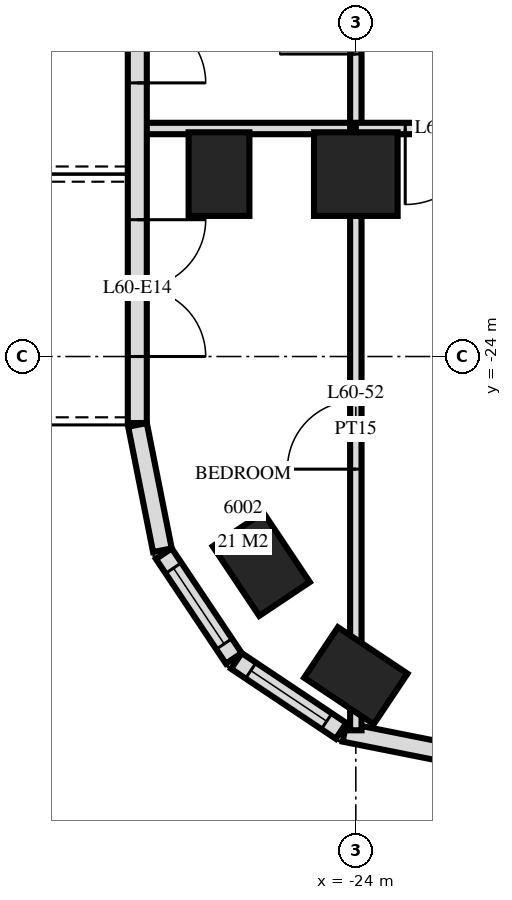
"""IFC4 building model, lengths in metres.
Left out: names, types, materials, properties, quantities, classifications, styles, units other than length and angle.
Written with IfcOpenShell. Run it as: python <this file> out.ifc"""

import sys

from ifc_helpers import new_model, si_unit, direction, frame, frame_2d, origin, origin_2d, place, context, subcontext, project, spatial, rectangle, extrude, element, fill, save


model = new_model("IFC4")
c1 = context("Model", 3, precision=1e-05, world=origin(), true_north=direction((0.0, 1.0)))
c2 = subcontext(c1, "Body", "Model", "MODEL_VIEW")
j1 = project(units=[si_unit("LENGTHUNIT", "METRE"), si_unit("PLANEANGLEUNIT", "RADIAN")], contexts=[c1])
p1 = place(None, origin())
s1 = spatial("IfcSite", under=j1, at=p1, CompositionType="ELEMENT")
p2 = place(p1, origin())
s2 = spatial("IfcBuilding", under=s1, at=p2, CompositionType="ELEMENT")
p3 = place(p2, frame((0.0, 0.0, 229.1)))
s3 = spatial("IfcBuildingStorey", under=s2, at=p3, CompositionType="ELEMENT", Elevation=229.1)
for number, where, z_axis, x_axis in (
    (1, (-25.8, -21.6, 0.0), (0.0, 0.0, 1.0), (0.0, 1.0, 0.0)),
    (2, (-25.244, -26.733, 0.0), (0.0, 0.0, 1.0), (-0.556, 0.831, 0.0)),
    (3, (-24.0, -28.2, 0.0), (0.0, 0.0, 1.0), (-0.831, 0.556, 0.0)),
):
    element("IfcColumn", number, at=place(p3, frame(where, z_axis=z_axis, x_axis=x_axis)), inside=s3, PredefinedType="COLUMN", context=c2, shape_type="SweptSolid", body=[
        extrude(rectangle(XDim=1.1, YDim=0.8, at=origin_2d()), origin(), (0.0, 0.0, 1.0), 3.5),
    ])
p4 = place(p3, frame((-24.0, -21.6, 0.0), z_axis=(0.0, 0.0, 1.0), x_axis=(1.0, 0.0, 0.0)))
e4 = element("IfcColumn", 4, at=p4, inside=s3, PredefinedType="COLUMN", context=c2, shape_type="SweptSolid", body=[
    extrude(rectangle(XDim=1.1, YDim=1.1, at=origin_2d()), origin(), (0.0, 0.0, 1.0), 3.5),
])
p5 = place(p3, frame((-26.875, -3.325, 0.0), z_axis=(0.0, 0.0, 1.0), x_axis=(0.0, -1.0, 0.0)))
e5 = element("IfcWall", 5, at=p5, inside=s3, PredefinedType="SOLIDWALL", context=c2, shape_type="SweptSolid", body=[
    extrude(rectangle(XDim=21.551, YDim=0.25, at=frame_2d((10.775, 0.0))), origin(), (0.0, 0.0, 1.0), 3.22),
])
p6 = place(p5, frame((6.575, 0.0, 0.0)))
e6 = element("IfcOpeningElement", 6, at=p6, cuts=e5, PredefinedType="OPENING", context=c2, shape_type="SweptSolid", body=[
    extrude(rectangle(XDim=1.8, YDim=2.4, at=frame_2d((0.9, 1.2))), frame((0.0, 0.135, 0.0), z_axis=(0.0, -1.0, 0.0), x_axis=(1.0, 0.0, 0.0)), (0.0, 0.0, 1.0), 0.27),
])
p7 = place(p5, frame((9.425, 0.0, 0.9)))
e7 = element("IfcOpeningElement", 7, at=p7, cuts=e5, PredefinedType="OPENING", context=c2, shape_type="SweptSolid", body=[
    extrude(rectangle(XDim=1.8, YDim=1.5, at=frame_2d((0.9, 0.75))), frame((0.0, 0.135, 0.0), z_axis=(0.0, -1.0, 0.0), x_axis=(1.0, 0.0, 0.0)), (0.0, 0.0, 1.0), 0.27),
])
p8 = place(p5, frame((12.575, 0.0, 0.9)))
e8 = element("IfcOpeningElement", 8, at=p8, cuts=e5, PredefinedType="OPENING", context=c2, shape_type="SweptSolid", body=[
    extrude(rectangle(XDim=1.2, YDim=1.5, at=frame_2d((0.6, 0.75))), frame((0.0, 0.135, 0.0), z_axis=(0.0, -1.0, 0.0), x_axis=(1.0, 0.0, 0.0)), (0.0, 0.0, 1.0), 0.27),
])
p9 = place(p5, frame((15.275, 0.0, 0.0)))
e9 = element("IfcOpeningElement", 9, at=p9, cuts=e5, PredefinedType="OPENING", context=c2, shape_type="SweptSolid", body=[
    extrude(rectangle(XDim=1.8, YDim=2.4, at=frame_2d((0.9, 1.2))), frame((0.0, 0.135, 0.0), z_axis=(0.0, -1.0, 0.0), x_axis=(1.0, 0.0, 0.0)), (0.0, 0.0, 1.0), 0.27),
])
p10 = place(p5, frame((18.875, 0.0, 0.0)))
e10 = element("IfcOpeningElement", 10, at=p10, cuts=e5, PredefinedType="OPENING", context=c2, shape_type="SweptSolid", body=[
    extrude(rectangle(XDim=1.8, YDim=2.4, at=frame_2d((0.9, 1.2))), frame((0.0, 0.135, 0.0), z_axis=(0.0, -1.0, 0.0), x_axis=(1.0, 0.0, 0.0)), (0.0, 0.0, 1.0), 0.27),
])
p11 = place(p3, frame((-26.873, -24.9, 0.0), z_axis=(0.0, 0.0, 1.0), x_axis=(0.195026884138, -0.980797896849, 0.0)))
e11 = element("IfcWall", 11, at=p11, inside=s3, PredefinedType="SOLIDWALL", context=c2, shape_type="SweptSolid", body=[
    extrude(rectangle(XDim=1.681, YDim=0.25, at=frame_2d((0.841, 0.0))), origin(), (0.0, 0.0, 1.0), 3.22),
])
p12 = place(p3, frame((-26.526, -26.594, 0.0), z_axis=(0.0, 0.0, 1.0), x_axis=(0.55555029066, -0.831482937015, 0.0)))
e12 = element("IfcWall", 12, at=p12, inside=s3, PredefinedType="SOLIDWALL", context=c2, shape_type="SweptSolid", body=[
    extrude(rectangle(XDim=1.656, YDim=0.25, at=frame_2d((0.828, 0.0))), origin(), (0.0, 0.0, 1.0), 3.22),
])
p13 = place(p12, frame((0.228, 0.0, 0.9)))
e13 = element("IfcOpeningElement", 13, at=p13, cuts=e12, PredefinedType="OPENING", context=c2, shape_type="SweptSolid", body=[
    extrude(rectangle(XDim=1.2, YDim=1.5, at=frame_2d((0.6, 0.75))), frame((0.0, 0.135, 0.0), z_axis=(0.0, -1.0, 0.0), x_axis=(1.0, 0.0, 0.0)), (0.0, 0.0, 1.0), 0.27),
])
p14 = place(p3, frame((-25.571, -28.006, 0.0), z_axis=(0.0, 0.0, 1.0), x_axis=(0.831482937015, -0.55555029066, 0.0)))
e14 = element("IfcWall", 14, at=p14, inside=s3, PredefinedType="SOLIDWALL", context=c2, shape_type="SweptSolid", body=[
    extrude(rectangle(XDim=1.656, YDim=0.25, at=frame_2d((0.828, 0.0))), origin(), (0.0, 0.0, 1.0), 3.22),
])
p15 = place(p14, frame((0.228, 0.0, 0.9)))
e15 = element("IfcOpeningElement", 15, at=p15, cuts=e14, PredefinedType="OPENING", context=c2, shape_type="SweptSolid", body=[
    extrude(rectangle(XDim=1.2, YDim=1.5, at=frame_2d((0.6, 0.75))), frame((0.0, 0.135, 0.0), z_axis=(0.0, -1.0, 0.0), x_axis=(1.0, 0.0, 0.0)), (0.0, 0.0, 1.0), 0.27),
])
p16 = place(p3, frame((-24.149, -28.945, 0.0), z_axis=(0.0, 0.0, 1.0), x_axis=(0.980775640221, -0.19513878023, 0.0)))
e16 = element("IfcWall", 16, at=p16, inside=s3, PredefinedType="SOLIDWALL", context=c2, shape_type="SweptSolid", body=[
    extrude(rectangle(XDim=1.681, YDim=0.25, at=frame_2d((0.841, 0.0))), origin(), (0.0, 0.0, 1.0), 3.22),
])
p17 = place(p3, frame((-24.0, -21.0, 0.0), z_axis=(0.0, 0.0, 1.0), x_axis=(0.0, 1.0, 0.0)))
e17 = element("IfcWall", 17, at=p17, inside=s3, PredefinedType="PARTITIONING", context=c2, shape_type="SweptSolid", body=[
    extrude(rectangle(XDim=3.0, YDim=0.15, at=frame_2d((1.5, 0.0))), origin(), (0.0, 0.0, 1.0), 3.22),
])
p18 = place(p17, frame((0.98, 0.0, 0.0)))
e18 = element("IfcOpeningElement", 18, at=p18, cuts=e17, PredefinedType="OPENING", context=c2, shape_type="SweptSolid", body=[
    extrude(rectangle(XDim=1.0, YDim=2.1, at=frame_2d((0.5, 1.05))), frame((0.0, 0.085, 0.0), z_axis=(0.0, -1.0, 0.0), x_axis=(1.0, 0.0, 0.0)), (0.0, 0.0, 1.0), 0.17),
])
p19 = place(p3, frame((-24.0, -28.918, 0.0), z_axis=(0.0, 0.0, 1.0), x_axis=(0.0, 1.0, 0.0)))
e19 = element("IfcWall", 19, at=p19, inside=s3, PredefinedType="PARTITIONING", context=c2, shape_type="SweptSolid", body=[
    extrude(rectangle(XDim=7.918, YDim=0.15, at=frame_2d((3.959, 0.0))), origin(), (0.0, 0.0, 1.0), 3.22),
])
p20 = place(p19, frame((3.436, 0.0, 0.0)))
e20 = element("IfcOpeningElement", 20, at=p20, cuts=e19, PredefinedType="OPENING", context=c2, shape_type="SweptSolid", body=[
    extrude(rectangle(XDim=0.9, YDim=2.1, at=frame_2d((0.45, 1.05))), frame((0.0, 0.085, 0.0), z_axis=(0.0, -1.0, 0.0), x_axis=(1.0, 0.0, 0.0)), (0.0, 0.0, 1.0), 0.17),
])
p21 = place(p3, frame((-24.0, -21.0, 0.0), z_axis=(0.0, 0.0, 1.0), x_axis=(1.0, 0.0, 0.0)))
e21 = element("IfcWall", 21, at=p21, inside=s3, PredefinedType="PARTITIONING", context=c2, shape_type="SweptSolid", body=[
    extrude(rectangle(XDim=1.8, YDim=0.15, at=frame_2d((0.9, 0.0))), origin(), (0.0, 0.0, 1.0), 3.22),
])
p22 = place(p21, frame((0.65, 0.0, 0.0)))
e22 = element("IfcOpeningElement", 22, at=p22, cuts=e21, PredefinedType="OPENING", context=c2, shape_type="SweptSolid", body=[
    extrude(rectangle(XDim=1.0, YDim=2.1, at=frame_2d((0.5, 1.05))), frame((0.0, 0.085, 0.0), z_axis=(0.0, -1.0, 0.0), x_axis=(1.0, 0.0, 0.0)), (0.0, 0.0, 1.0), 0.17),
])
p23 = place(p3, frame((-26.82, -21.0, 0.0), z_axis=(0.0, 0.0, 1.0), x_axis=(1.0, 0.0, 0.0)))
e23 = element("IfcWall", 23, at=p23, inside=s3, PredefinedType="PARTITIONING", context=c2, shape_type="SweptSolid", body=[
    extrude(rectangle(XDim=2.82, YDim=0.15, at=frame_2d((1.41, 0.0))), origin(), (0.0, 0.0, 1.0), 3.22),
])
p24 = place(p13, origin())
e24 = element("IfcWindow", 24, at=p24, inside=s3, PartitioningType="SINGLE_PANEL", PredefinedType="WINDOW", context=c2, shape_type="SweptSolid", body=[
    extrude(rectangle(XDim=1.2, YDim=1.5, at=frame_2d((0.6, 0.75))), frame((0.0, 0.03, 0.0), z_axis=(0.0, -1.0, 0.0), x_axis=(1.0, 0.0, 0.0)), (0.0, 0.0, 1.0), 0.06),
])
fill(e13, e24)
p25 = place(p15, origin())
e25 = element("IfcWindow", 25, at=p25, inside=s3, PartitioningType="SINGLE_PANEL", PredefinedType="WINDOW", context=c2, shape_type="SweptSolid", body=[
    extrude(rectangle(XDim=1.2, YDim=1.5, at=frame_2d((0.6, 0.75))), frame((0.0, 0.03, 0.0), z_axis=(0.0, -1.0, 0.0), x_axis=(1.0, 0.0, 0.0)), (0.0, 0.0, 1.0), 0.06),
])
fill(e15, e25)
p26 = place(p9, origin())
e26 = element("IfcDoor", 26, at=p26, inside=s3, OperationType="DOUBLE_DOOR_SINGLE_SWING", PredefinedType="DOOR", context=c2, shape_type="SweptSolid", body=[
    extrude(rectangle(XDim=1.8, YDim=2.4, at=frame_2d((0.9, 1.2))), frame((0.0, 0.025, 0.0), z_axis=(0.0, -1.0, 0.0), x_axis=(1.0, 0.0, 0.0)), (0.0, 0.0, 1.0), 0.05),
])
fill(e9, e26)
p27 = place(p10, origin())
e27 = element("IfcDoor", 27, at=p27, inside=s3, OperationType="DOUBLE_DOOR_SINGLE_SWING", PredefinedType="DOOR", context=c2, shape_type="SweptSolid", body=[
    extrude(rectangle(XDim=1.8, YDim=2.4, at=frame_2d((0.9, 1.2))), frame((0.0, 0.025, 0.0), z_axis=(0.0, -1.0, 0.0), x_axis=(1.0, 0.0, 0.0)), (0.0, 0.0, 1.0), 0.05),
])
fill(e10, e27)
p28 = place(p18, origin())
e28 = element("IfcDoor", 28, at=p28, inside=s3, OperationType="SINGLE_SWING_RIGHT", PredefinedType="DOOR", context=c2, shape_type="SweptSolid", body=[
    extrude(rectangle(XDim=1.0, YDim=2.1, at=frame_2d((0.5, 1.05))), frame((0.0, 0.025, 0.0), z_axis=(0.0, -1.0, 0.0), x_axis=(1.0, 0.0, 0.0)), (0.0, 0.0, 1.0), 0.05),
])
fill(e18, e28)
p29 = place(p22, frame((0.5, 0.0, 0.0), z_axis=(0.0, 0.0, 1.0), x_axis=(-1.0, 0.0, 0.0)))
e29 = element("IfcDoor", 29, at=p29, inside=s3, OperationType="SINGLE_SWING_LEFT", PredefinedType="DOOR", context=c2, shape_type="SweptSolid", body=[
    extrude(rectangle(XDim=1.0, YDim=2.1, at=frame_2d((0.0, 1.05))), frame((0.0, -0.025, 0.0), z_axis=(0.0, 1.0, 0.0), x_axis=(-1.0, 0.0, 0.0)), (0.0, 0.0, 1.0), 0.05),
])
fill(e22, e29)
p30 = place(p20, origin())
e30 = element("IfcDoor", 30, at=p30, inside=s3, OperationType="SINGLE_SWING_RIGHT", PredefinedType="DOOR", context=c2, shape_type="SweptSolid", body=[
    extrude(rectangle(XDim=0.9, YDim=2.1, at=frame_2d((0.45, 1.05))), frame((0.0, 0.025, 0.0), z_axis=(0.0, -1.0, 0.0), x_axis=(1.0, 0.0, 0.0)), (0.0, 0.0, 1.0), 0.05),
])
fill(e20, e30)
save(model, sys.argv[1])
